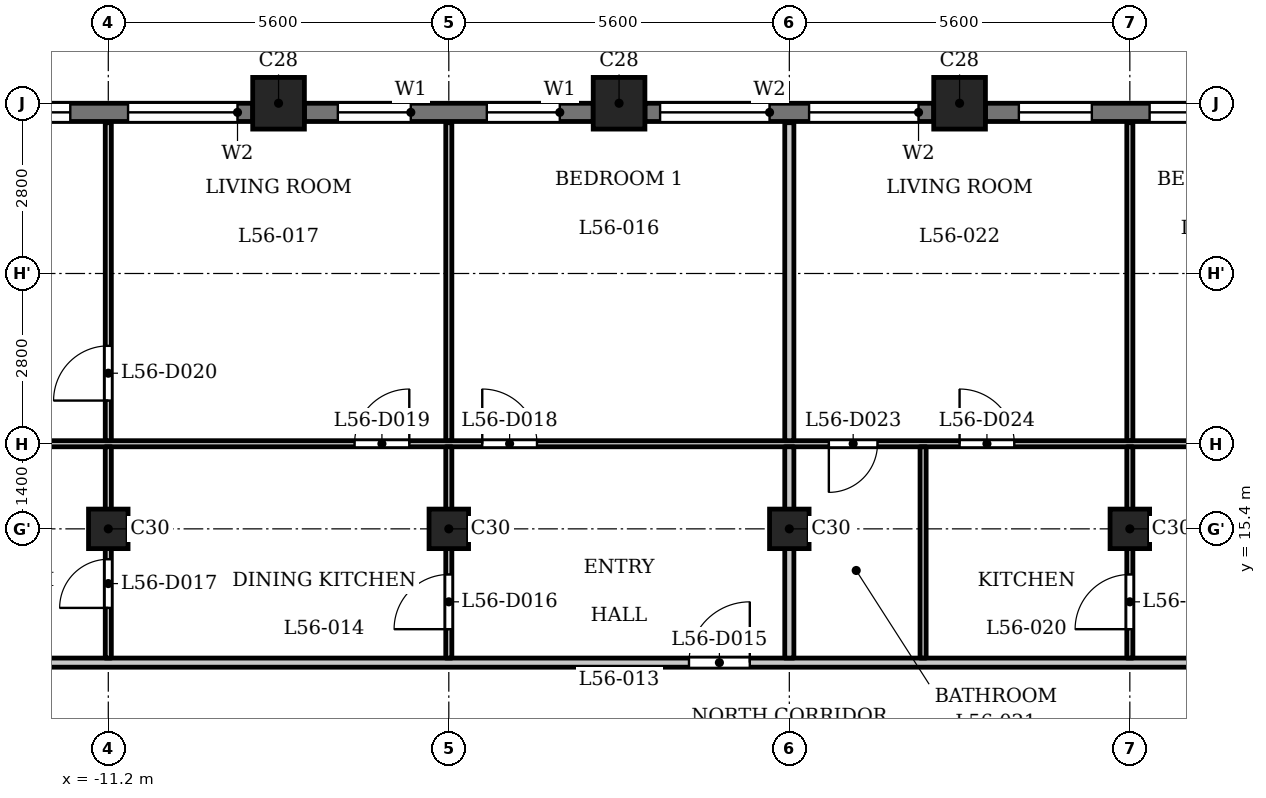
"""IFC4 building model, lengths in metres.
Left out: names, types, materials, properties, quantities, classifications, styles, units other than length and angle.
Written with IfcOpenShell. Run it as: python <this file> out.ifc"""

import sys

from ifc_helpers import new_model, si_unit, direction, frame, frame_2d, origin, origin_2d, place, context, subcontext, project, spatial, rectangle, extrude, element, fill, save


model = new_model("IFC4")
c1 = context("Model", 3, precision=1e-05, world=origin(), true_north=direction((0.0, 1.0)))
c2 = subcontext(c1, "Body", "Model", "MODEL_VIEW")
j1 = project(units=[si_unit("LENGTHUNIT", "METRE"), si_unit("PLANEANGLEUNIT", "RADIAN")], contexts=[c1])
p1 = place(None, origin())
s1 = spatial("IfcSite", under=j1, at=p1, CompositionType="ELEMENT")
p2 = place(p1, origin())
s2 = spatial("IfcBuilding", under=s1, at=p2, CompositionType="ELEMENT")
p3 = place(p2, frame((0.0, 0.0, 216.9)))
s3 = spatial("IfcBuildingStorey", under=s2, at=p3, CompositionType="ELEMENT", Elevation=216.9)
for number, where, z_axis, x_axis in (
    (1, (2.8, 22.4, 0.0), (0.0, 0.0, 1.0), (1.0, 0.0, 0.0)),
    (2, (-2.8, 22.4, 0.0), (0.0, 0.0, 1.0), (1.0, 0.0, 0.0)),
    (3, (-8.4, 22.4, 0.0), (0.0, 0.0, 1.0), (1.0, 0.0, 0.0)),
):
    element("IfcColumn", number, at=place(p3, frame(where, z_axis=z_axis, x_axis=x_axis)), inside=s3, PredefinedType="COLUMN", context=c2, shape_type="SweptSolid", body=[
        extrude(rectangle(XDim=0.85, YDim=0.85, at=origin_2d()), origin(), (0.0, 0.0, 1.0), 3.5),
    ])
for number, where, z_axis, x_axis in (
    (4, (-11.2, 15.4, 0.0), (0.0, 0.0, 1.0), (1.0, 0.0, 0.0)),
    (5, (-5.6, 15.4, 0.0), (0.0, 0.0, 1.0), (1.0, 0.0, 0.0)),
    (6, (0.0, 15.4, 0.0), (0.0, 0.0, 1.0), (1.0, 0.0, 0.0)),
    (7, (5.6, 15.4, 0.0), (0.0, 0.0, 1.0), (1.0, 0.0, 0.0)),
):
    element("IfcColumn", number, at=place(p3, frame(where, z_axis=z_axis, x_axis=x_axis)), inside=s3, PredefinedType="COLUMN", context=c2, shape_type="SweptSolid", body=[
        extrude(rectangle(XDim=0.65, YDim=0.65, at=origin_2d()), origin(), (0.0, 0.0, 1.0), 3.5),
    ])
p4 = place(p3, frame((7.975, 22.25, 0.0), z_axis=(0.0, 0.0, 1.0), x_axis=(-1.0, 0.0, 0.0)))
e8 = element("IfcWall", 8, at=p4, inside=s3, PredefinedType="SOLIDWALL", context=c2, shape_type="SweptSolid", body=[
    extrude(rectangle(XDim=4.75, YDim=0.3, at=frame_2d((2.375, 0.0))), origin(), (0.0, 0.0, 1.0), 2.5),
])
p5 = place(p4, frame((0.25, 0.0, 0.9)))
e9 = element("IfcOpeningElement", 9, at=p5, cuts=e8, PredefinedType="OPENING", context=c2, shape_type="SweptSolid", body=[
    extrude(rectangle(XDim=1.8, YDim=1.25, at=frame_2d((0.9, 0.625))), frame((0.0, 0.16, 0.0), z_axis=(0.0, -1.0, 0.0), x_axis=(1.0, 0.0, 0.0)), (0.0, 0.0, 1.0), 0.32),
])
p6 = place(p4, frame((3.0, 0.0, 0.6)))
e10 = element("IfcOpeningElement", 10, at=p6, cuts=e8, PredefinedType="OPENING", context=c2, shape_type="SweptSolid", body=[
    extrude(rectangle(XDim=1.2, YDim=1.55, at=frame_2d((0.6, 0.775))), frame((0.0, 0.16, 0.0), z_axis=(0.0, -1.0, 0.0), x_axis=(1.0, 0.0, 0.0)), (0.0, 0.0, 1.0), 0.32),
])
p7 = place(p3, frame((2.375, 22.25, 0.0), z_axis=(0.0, 0.0, 1.0), x_axis=(-1.0, 0.0, 0.0)))
e11 = element("IfcWall", 11, at=p7, inside=s3, PredefinedType="SOLIDWALL", context=c2, shape_type="SweptSolid", body=[
    extrude(rectangle(XDim=4.75, YDim=0.3, at=frame_2d((2.375, 0.0))), origin(), (0.0, 0.0, 1.0), 2.5),
])
p8 = place(p7, frame((0.25, 0.0, 0.9)))
e12 = element("IfcOpeningElement", 12, at=p8, cuts=e11, PredefinedType="OPENING", context=c2, shape_type="SweptSolid", body=[
    extrude(rectangle(XDim=1.8, YDim=1.25, at=frame_2d((0.9, 0.625))), frame((0.0, 0.16, 0.0), z_axis=(0.0, -1.0, 0.0), x_axis=(1.0, 0.0, 0.0)), (0.0, 0.0, 1.0), 0.32),
])
p9 = place(p7, frame((2.7, 0.0, 0.9)))
e13 = element("IfcOpeningElement", 13, at=p9, cuts=e11, PredefinedType="OPENING", context=c2, shape_type="SweptSolid", body=[
    extrude(rectangle(XDim=1.8, YDim=1.25, at=frame_2d((0.9, 0.625))), frame((0.0, 0.16, 0.0), z_axis=(0.0, -1.0, 0.0), x_axis=(1.0, 0.0, 0.0)), (0.0, 0.0, 1.0), 0.32),
])
p10 = place(p3, frame((-3.225, 22.25, 0.0), z_axis=(0.0, 0.0, 1.0), x_axis=(-1.0, 0.0, 0.0)))
e14 = element("IfcWall", 14, at=p10, inside=s3, PredefinedType="SOLIDWALL", context=c2, shape_type="SweptSolid", body=[
    extrude(rectangle(XDim=4.75, YDim=0.3, at=frame_2d((2.375, 0.0))), origin(), (0.0, 0.0, 1.0), 2.5),
])
p11 = place(p10, frame((0.55, 0.0, 0.6)))
e15 = element("IfcOpeningElement", 15, at=p11, cuts=e14, PredefinedType="OPENING", context=c2, shape_type="SweptSolid", body=[
    extrude(rectangle(XDim=1.2, YDim=1.55, at=frame_2d((0.6, 0.775))), frame((0.0, 0.16, 0.0), z_axis=(0.0, -1.0, 0.0), x_axis=(1.0, 0.0, 0.0)), (0.0, 0.0, 1.0), 0.32),
])
p12 = place(p10, frame((3.0, 0.0, 0.6)))
e16 = element("IfcOpeningElement", 16, at=p12, cuts=e14, PredefinedType="OPENING", context=c2, shape_type="SweptSolid", body=[
    extrude(rectangle(XDim=1.2, YDim=1.55, at=frame_2d((0.6, 0.775))), frame((0.0, 0.16, 0.0), z_axis=(0.0, -1.0, 0.0), x_axis=(1.0, 0.0, 0.0)), (0.0, 0.0, 1.0), 0.32),
])
p13 = place(p3, frame((-8.825, 22.25, 0.0), z_axis=(0.0, 0.0, 1.0), x_axis=(-1.0, 0.0, 0.0)))
e17 = element("IfcWall", 17, at=p13, inside=s3, PredefinedType="SOLIDWALL", context=c2, shape_type="SweptSolid", body=[
    extrude(rectangle(XDim=4.75, YDim=0.3, at=frame_2d((2.375, 0.0))), origin(), (0.0, 0.0, 1.0), 2.5),
])
p14 = place(p13, frame((0.25, 0.0, 0.9)))
e18 = element("IfcOpeningElement", 18, at=p14, cuts=e17, PredefinedType="OPENING", context=c2, shape_type="SweptSolid", body=[
    extrude(rectangle(XDim=1.8, YDim=1.25, at=frame_2d((0.9, 0.625))), frame((0.0, 0.16, 0.0), z_axis=(0.0, -1.0, 0.0), x_axis=(1.0, 0.0, 0.0)), (0.0, 0.0, 1.0), 0.32),
])
p15 = place(p13, frame((3.0, 0.0, 0.6)))
e19 = element("IfcOpeningElement", 19, at=p15, cuts=e17, PredefinedType="OPENING", context=c2, shape_type="SweptSolid", body=[
    extrude(rectangle(XDim=1.2, YDim=1.55, at=frame_2d((0.6, 0.775))), frame((0.0, 0.16, 0.0), z_axis=(0.0, -1.0, 0.0), x_axis=(1.0, 0.0, 0.0)), (0.0, 0.0, 1.0), 0.32),
])
p16 = place(p3, frame((-17.4, 13.2, 0.0), z_axis=(0.0, 0.0, 1.0), x_axis=(1.0, 0.0, 0.0)))
e20 = element("IfcWall", 20, at=p16, inside=s3, PredefinedType="PARTITIONING", context=c2, shape_type="SweptSolid", body=[
    extrude(rectangle(XDim=34.8, YDim=0.15, at=frame_2d((17.4, 0.0))), origin(), (0.0, 0.0, 1.0), 3.2),
])
p17 = place(p16, frame((0.25, 0.0, 0.0)))
e21 = element("IfcOpeningElement", 21, at=p17, cuts=e20, PredefinedType="OPENING", context=c2, shape_type="SweptSolid", body=[
    extrude(rectangle(XDim=1.0, YDim=2.1, at=frame_2d((0.5, 1.05))), frame((0.0, 0.085, 0.0), z_axis=(0.0, -1.0, 0.0), x_axis=(1.0, 0.0, 0.0)), (0.0, 0.0, 1.0), 0.17),
])
p18 = place(p16, frame((33.65, 0.0, 0.0)))
e22 = element("IfcOpeningElement", 22, at=p18, cuts=e20, PredefinedType="OPENING", context=c2, shape_type="SweptSolid", body=[
    extrude(rectangle(XDim=1.0, YDim=2.1, at=frame_2d((0.5, 1.05))), frame((0.0, 0.085, 0.0), z_axis=(0.0, -1.0, 0.0), x_axis=(1.0, 0.0, 0.0)), (0.0, 0.0, 1.0), 0.17),
])
p19 = place(p16, frame((15.75, 0.0, 0.0)))
e23 = element("IfcOpeningElement", 23, at=p19, cuts=e20, PredefinedType="OPENING", context=c2, shape_type="SweptSolid", body=[
    extrude(rectangle(XDim=1.0, YDim=2.1, at=frame_2d((0.5, 1.05))), frame((0.0, 0.085, 0.0), z_axis=(0.0, -1.0, 0.0), x_axis=(1.0, 0.0, 0.0)), (0.0, 0.0, 1.0), 0.17),
])
p20 = place(p16, frame((26.95, 0.0, 0.0)))
e24 = element("IfcOpeningElement", 24, at=p20, cuts=e20, PredefinedType="OPENING", context=c2, shape_type="SweptSolid", body=[
    extrude(rectangle(XDim=1.0, YDim=2.1, at=frame_2d((0.5, 1.05))), frame((0.0, 0.085, 0.0), z_axis=(0.0, -1.0, 0.0), x_axis=(1.0, 0.0, 0.0)), (0.0, 0.0, 1.0), 0.17),
])
p21 = place(p16, frame((29.75, 0.0, 0.0)))
e25 = element("IfcOpeningElement", 25, at=p21, cuts=e20, PredefinedType="OPENING", context=c2, shape_type="SweptSolid", body=[
    extrude(rectangle(XDim=1.0, YDim=2.1, at=frame_2d((0.5, 1.05))), frame((0.0, 0.085, 0.0), z_axis=(0.0, -1.0, 0.0), x_axis=(1.0, 0.0, 0.0)), (0.0, 0.0, 1.0), 0.17),
])
p22 = place(p3, frame((-16.725, 16.8, 0.0), z_axis=(0.0, 0.0, 1.0), x_axis=(1.0, 0.0, 0.0)))
e26 = element("IfcWall", 26, at=p22, inside=s3, PredefinedType="PARTITIONING", context=c2, shape_type="SweptSolid", body=[
    extrude(rectangle(XDim=33.45, YDim=0.1, at=frame_2d((16.725, 0.0))), origin(), (0.0, 0.0, 1.0), 3.2),
])
p23 = place(p22, frame((11.675, 0.0, 0.0)))
e27 = element("IfcOpeningElement", 27, at=p23, cuts=e26, PredefinedType="OPENING", context=c2, shape_type="SweptSolid", body=[
    extrude(rectangle(XDim=0.9, YDim=2.1, at=frame_2d((0.45, 1.05))), frame((0.0, 0.06, 0.0), z_axis=(0.0, -1.0, 0.0), x_axis=(1.0, 0.0, 0.0)), (0.0, 0.0, 1.0), 0.12),
])
p24 = place(p22, frame((9.575, 0.0, 0.0)))
e28 = element("IfcOpeningElement", 28, at=p24, cuts=e26, PredefinedType="OPENING", context=c2, shape_type="SweptSolid", body=[
    extrude(rectangle(XDim=0.9, YDim=2.1, at=frame_2d((0.45, 1.05))), frame((0.0, 0.06, 0.0), z_axis=(0.0, -1.0, 0.0), x_axis=(1.0, 0.0, 0.0)), (0.0, 0.0, 1.0), 0.12),
])
p25 = place(p22, frame((17.375, 0.0, 0.0)))
e29 = element("IfcOpeningElement", 29, at=p25, cuts=e26, PredefinedType="OPENING", context=c2, shape_type="SweptSolid", body=[
    extrude(rectangle(XDim=0.8, YDim=2.1, at=frame_2d((0.4, 1.05))), frame((0.0, 0.06, 0.0), z_axis=(0.0, -1.0, 0.0), x_axis=(1.0, 0.0, 0.0)), (0.0, 0.0, 1.0), 0.12),
])
p26 = place(p22, frame((19.525, 0.0, 0.0)))
e30 = element("IfcOpeningElement", 30, at=p26, cuts=e26, PredefinedType="OPENING", context=c2, shape_type="SweptSolid", body=[
    extrude(rectangle(XDim=0.9, YDim=2.1, at=frame_2d((0.45, 1.05))), frame((0.0, 0.06, 0.0), z_axis=(0.0, -1.0, 0.0), x_axis=(1.0, 0.0, 0.0)), (0.0, 0.0, 1.0), 0.12),
])
p27 = place(p22, frame((23.775, 0.0, 0.0)))
e31 = element("IfcOpeningElement", 31, at=p27, cuts=e26, PredefinedType="OPENING", context=c2, shape_type="SweptSolid", body=[
    extrude(rectangle(XDim=0.9, YDim=2.1, at=frame_2d((0.45, 1.05))), frame((0.0, 0.06, 0.0), z_axis=(0.0, -1.0, 0.0), x_axis=(1.0, 0.0, 0.0)), (0.0, 0.0, 1.0), 0.12),
])
p28 = place(p22, frame((26.125, 0.0, 0.0)))
e32 = element("IfcOpeningElement", 32, at=p28, cuts=e26, PredefinedType="OPENING", context=c2, shape_type="SweptSolid", body=[
    extrude(rectangle(XDim=0.9, YDim=2.1, at=frame_2d((0.45, 1.05))), frame((0.0, 0.06, 0.0), z_axis=(0.0, -1.0, 0.0), x_axis=(1.0, 0.0, 0.0)), (0.0, 0.0, 1.0), 0.12),
])
p29 = place(p22, frame((32.075, 0.0, 0.0)))
e33 = element("IfcOpeningElement", 33, at=p29, cuts=e26, PredefinedType="OPENING", context=c2, shape_type="SweptSolid", body=[
    extrude(rectangle(XDim=0.8, YDim=2.1, at=frame_2d((0.4, 1.05))), frame((0.0, 0.06, 0.0), z_axis=(0.0, -1.0, 0.0), x_axis=(1.0, 0.0, 0.0)), (0.0, 0.0, 1.0), 0.12),
])
p30 = place(p22, frame((29.175, 0.0, 0.0)))
e34 = element("IfcOpeningElement", 34, at=p30, cuts=e26, PredefinedType="OPENING", context=c2, shape_type="SweptSolid", body=[
    extrude(rectangle(XDim=0.9, YDim=2.1, at=frame_2d((0.45, 1.05))), frame((0.0, 0.06, 0.0), z_axis=(0.0, -1.0, 0.0), x_axis=(1.0, 0.0, 0.0)), (0.0, 0.0, 1.0), 0.12),
])
p31 = place(p3, frame((-11.2, 13.275, 0.0), z_axis=(0.0, 0.0, 1.0), x_axis=(0.0, 1.0, 0.0)))
e35 = element("IfcWall", 35, at=p31, inside=s3, PredefinedType="PARTITIONING", context=c2, shape_type="SweptSolid", body=[
    extrude(rectangle(XDim=3.475, YDim=0.1, at=frame_2d((1.738, 0.0))), origin(), (0.0, 0.0, 1.0), 3.2),
])
p32 = place(p31, frame((0.825, 0.0, 0.0)))
e36 = element("IfcOpeningElement", 36, at=p32, cuts=e35, PredefinedType="OPENING", context=c2, shape_type="SweptSolid", body=[
    extrude(rectangle(XDim=0.8, YDim=2.1, at=frame_2d((0.4, 1.05))), frame((0.0, 0.06, 0.0), z_axis=(0.0, -1.0, 0.0), x_axis=(1.0, 0.0, 0.0)), (0.0, 0.0, 1.0), 0.12),
])
p33 = place(p3, frame((-11.2, 16.85, 0.0), z_axis=(0.0, 0.0, 1.0), x_axis=(0.0, 1.0, 0.0)))
e37 = element("IfcWall", 37, at=p33, inside=s3, PredefinedType="PARTITIONING", context=c2, shape_type="SweptSolid", body=[
    extrude(rectangle(XDim=5.23, YDim=0.1, at=frame_2d((2.615, 0.0))), origin(), (0.0, 0.0, 1.0), 3.2),
])
p34 = place(p33, frame((0.66, 0.0, 0.0)))
e38 = element("IfcOpeningElement", 38, at=p34, cuts=e37, PredefinedType="OPENING", context=c2, shape_type="SweptSolid", body=[
    extrude(rectangle(XDim=0.9, YDim=2.1, at=frame_2d((0.45, 1.05))), frame((0.0, 0.06, 0.0), z_axis=(0.0, -1.0, 0.0), x_axis=(1.0, 0.0, 0.0)), (0.0, 0.0, 1.0), 0.12),
])
p35 = place(p3, frame((-5.6, 13.275, 0.0), z_axis=(0.0, 0.0, 1.0), x_axis=(0.0, 1.0, 0.0)))
e39 = element("IfcWall", 39, at=p35, inside=s3, PredefinedType="PARTITIONING", context=c2, shape_type="SweptSolid", body=[
    extrude(rectangle(XDim=3.475, YDim=0.1, at=frame_2d((1.738, 0.0))), origin(), (0.0, 0.0, 1.0), 3.2),
])
p36 = place(p35, frame((0.475, 0.0, 0.0)))
e40 = element("IfcOpeningElement", 40, at=p36, cuts=e39, PredefinedType="OPENING", context=c2, shape_type="SweptSolid", body=[
    extrude(rectangle(XDim=0.9, YDim=2.1, at=frame_2d((0.45, 1.05))), frame((0.0, 0.06, 0.0), z_axis=(0.0, -1.0, 0.0), x_axis=(1.0, 0.0, 0.0)), (0.0, 0.0, 1.0), 0.12),
])
p37 = place(p3, frame((-5.6, 16.85, 0.0), z_axis=(0.0, 0.0, 1.0), x_axis=(0.0, 1.0, 0.0)))
e41 = element("IfcWall", 41, at=p37, inside=s3, PredefinedType="PARTITIONING", context=c2, shape_type="SweptSolid", body=[
    extrude(rectangle(XDim=5.23, YDim=0.1, at=frame_2d((2.615, 0.0))), origin(), (0.0, 0.0, 1.0), 3.2),
])
p38 = place(p3, frame((0.0, 13.275, 0.0), z_axis=(0.0, 0.0, 1.0), x_axis=(0.0, 1.0, 0.0)))
e42 = element("IfcWall", 42, at=p38, inside=s3, PredefinedType="PARTITIONING", context=c2, shape_type="SweptSolid", body=[
    extrude(rectangle(XDim=3.475, YDim=0.15, at=frame_2d((1.738, 0.0))), origin(), (0.0, 0.0, 1.0), 3.2),
])
p39 = place(p3, frame((0.0, 16.85, 0.0), z_axis=(0.0, 0.0, 1.0), x_axis=(0.0, 1.0, 0.0)))
e43 = element("IfcWall", 43, at=p39, inside=s3, PredefinedType="PARTITIONING", context=c2, shape_type="SweptSolid", body=[
    extrude(rectangle(XDim=5.23, YDim=0.15, at=frame_2d((2.615, 0.0))), origin(), (0.0, 0.0, 1.0), 3.2),
])
p40 = place(p3, frame((2.2, 13.275, 0.0), z_axis=(0.0, 0.0, 1.0), x_axis=(0.0, 1.0, 0.0)))
e44 = element("IfcWall", 44, at=p40, inside=s3, PredefinedType="PARTITIONING", context=c2, shape_type="SweptSolid", body=[
    extrude(rectangle(XDim=3.475, YDim=0.1, at=frame_2d((1.738, 0.0))), origin(), (0.0, 0.0, 1.0), 3.2),
])
p41 = place(p3, frame((5.6, 13.275, 0.0), z_axis=(0.0, 0.0, 1.0), x_axis=(0.0, 1.0, 0.0)))
e45 = element("IfcWall", 45, at=p41, inside=s3, PredefinedType="PARTITIONING", context=c2, shape_type="SweptSolid", body=[
    extrude(rectangle(XDim=3.475, YDim=0.1, at=frame_2d((1.738, 0.0))), origin(), (0.0, 0.0, 1.0), 3.2),
])
p42 = place(p41, frame((0.475, 0.0, 0.0)))
e46 = element("IfcOpeningElement", 46, at=p42, cuts=e45, PredefinedType="OPENING", context=c2, shape_type="SweptSolid", body=[
    extrude(rectangle(XDim=0.9, YDim=2.1, at=frame_2d((0.45, 1.05))), frame((0.0, 0.06, 0.0), z_axis=(0.0, -1.0, 0.0), x_axis=(1.0, 0.0, 0.0)), (0.0, 0.0, 1.0), 0.12),
])
p43 = place(p3, frame((5.6, 16.85, 0.0), z_axis=(0.0, 0.0, 1.0), x_axis=(0.0, 1.0, 0.0)))
e47 = element("IfcWall", 47, at=p43, inside=s3, PredefinedType="PARTITIONING", context=c2, shape_type="SweptSolid", body=[
    extrude(rectangle(XDim=5.23, YDim=0.1, at=frame_2d((2.615, 0.0))), origin(), (0.0, 0.0, 1.0), 3.2),
])
p44 = place(p19, origin())
e48 = element("IfcDoor", 48, at=p44, inside=s3, OperationType="SINGLE_SWING_LEFT", PredefinedType="DOOR", context=c2, shape_type="SweptSolid", body=[
    extrude(rectangle(XDim=1.0, YDim=2.1, at=frame_2d((0.5, 1.05))), frame((0.0, 0.025, 0.0), z_axis=(0.0, -1.0, 0.0), x_axis=(1.0, 0.0, 0.0)), (0.0, 0.0, 1.0), 0.05),
])
fill(e23, e48)
p45 = place(p36, origin())
e49 = element("IfcDoor", 49, at=p45, inside=s3, OperationType="SINGLE_SWING_RIGHT", PredefinedType="DOOR", context=c2, shape_type="SweptSolid", body=[
    extrude(rectangle(XDim=0.9, YDim=2.1, at=frame_2d((0.45, 1.05))), frame((0.0, 0.025, 0.0), z_axis=(0.0, -1.0, 0.0), x_axis=(1.0, 0.0, 0.0)), (0.0, 0.0, 1.0), 0.05),
])
fill(e40, e49)
p46 = place(p32, origin())
e50 = element("IfcDoor", 50, at=p46, inside=s3, OperationType="SINGLE_SWING_RIGHT", PredefinedType="DOOR", context=c2, shape_type="SweptSolid", body=[
    extrude(rectangle(XDim=0.8, YDim=2.1, at=frame_2d((0.4, 1.05))), frame((0.0, 0.025, 0.0), z_axis=(0.0, -1.0, 0.0), x_axis=(1.0, 0.0, 0.0)), (0.0, 0.0, 1.0), 0.05),
])
fill(e36, e50)
p47 = place(p23, origin())
e51 = element("IfcDoor", 51, at=p47, inside=s3, OperationType="SINGLE_SWING_RIGHT", PredefinedType="DOOR", context=c2, shape_type="SweptSolid", body=[
    extrude(rectangle(XDim=0.9, YDim=2.1, at=frame_2d((0.45, 1.05))), frame((0.0, 0.025, 0.0), z_axis=(0.0, -1.0, 0.0), x_axis=(1.0, 0.0, 0.0)), (0.0, 0.0, 1.0), 0.05),
])
fill(e27, e51)
p48 = place(p24, origin())
e52 = element("IfcDoor", 52, at=p48, inside=s3, OperationType="SINGLE_SWING_LEFT", PredefinedType="DOOR", context=c2, shape_type="SweptSolid", body=[
    extrude(rectangle(XDim=0.9, YDim=2.1, at=frame_2d((0.45, 1.05))), frame((0.0, 0.025, 0.0), z_axis=(0.0, -1.0, 0.0), x_axis=(1.0, 0.0, 0.0)), (0.0, 0.0, 1.0), 0.05),
])
fill(e28, e52)
p49 = place(p34, origin())
e53 = element("IfcDoor", 53, at=p49, inside=s3, OperationType="SINGLE_SWING_RIGHT", PredefinedType="DOOR", context=c2, shape_type="SweptSolid", body=[
    extrude(rectangle(XDim=0.9, YDim=2.1, at=frame_2d((0.45, 1.05))), frame((0.0, 0.025, 0.0), z_axis=(0.0, -1.0, 0.0), x_axis=(1.0, 0.0, 0.0)), (0.0, 0.0, 1.0), 0.05),
])
fill(e38, e53)
p50 = place(p42, origin())
e54 = element("IfcDoor", 54, at=p50, inside=s3, OperationType="SINGLE_SWING_RIGHT", PredefinedType="DOOR", context=c2, shape_type="SweptSolid", body=[
    extrude(rectangle(XDim=0.9, YDim=2.1, at=frame_2d((0.45, 1.05))), frame((0.0, 0.025, 0.0), z_axis=(0.0, -1.0, 0.0), x_axis=(1.0, 0.0, 0.0)), (0.0, 0.0, 1.0), 0.05),
])
fill(e46, e54)
p51 = place(p25, origin())
e55 = element("IfcDoor", 55, at=p51, inside=s3, OperationType="SINGLE_SWING_LEFT", PredefinedType="DOOR", context=c2, shape_type="SweptSolid", body=[
    extrude(rectangle(XDim=0.8, YDim=2.1, at=frame_2d((0.4, 1.05))), frame((0.0, 0.025, 0.0), z_axis=(0.0, -1.0, 0.0), x_axis=(1.0, 0.0, 0.0)), (0.0, 0.0, 1.0), 0.05),
])
fill(e29, e55)
p52 = place(p26, origin())
e56 = element("IfcDoor", 56, at=p52, inside=s3, OperationType="SINGLE_SWING_RIGHT", PredefinedType="DOOR", context=c2, shape_type="SweptSolid", body=[
    extrude(rectangle(XDim=0.9, YDim=2.1, at=frame_2d((0.45, 1.05))), frame((0.0, 0.025, 0.0), z_axis=(0.0, -1.0, 0.0), x_axis=(1.0, 0.0, 0.0)), (0.0, 0.0, 1.0), 0.05),
])
fill(e30, e56)
p53 = place(p5, origin())
e57 = element("IfcWindow", 57, at=p53, inside=s3, PartitioningType="SINGLE_PANEL", PredefinedType="WINDOW", context=c2, shape_type="SweptSolid", body=[
    extrude(rectangle(XDim=1.8, YDim=1.25, at=frame_2d((0.9, 0.625))), frame((0.0, 0.03, 0.0), z_axis=(0.0, -1.0, 0.0), x_axis=(1.0, 0.0, 0.0)), (0.0, 0.0, 1.0), 0.06),
])
fill(e9, e57)
p54 = place(p6, origin())
e58 = element("IfcWindow", 58, at=p54, inside=s3, PartitioningType="SINGLE_PANEL", PredefinedType="WINDOW", context=c2, shape_type="SweptSolid", body=[
    extrude(rectangle(XDim=1.2, YDim=1.55, at=frame_2d((0.6, 0.775))), frame((0.0, 0.03, 0.0), z_axis=(0.0, -1.0, 0.0), x_axis=(1.0, 0.0, 0.0)), (0.0, 0.0, 1.0), 0.06),
])
fill(e10, e58)
p55 = place(p8, origin())
e59 = element("IfcWindow", 59, at=p55, inside=s3, PartitioningType="SINGLE_PANEL", PredefinedType="WINDOW", context=c2, shape_type="SweptSolid", body=[
    extrude(rectangle(XDim=1.8, YDim=1.25, at=frame_2d((0.9, 0.625))), frame((0.0, 0.03, 0.0), z_axis=(0.0, -1.0, 0.0), x_axis=(1.0, 0.0, 0.0)), (0.0, 0.0, 1.0), 0.06),
])
fill(e12, e59)
p56 = place(p9, origin())
e60 = element("IfcWindow", 60, at=p56, inside=s3, PartitioningType="SINGLE_PANEL", PredefinedType="WINDOW", context=c2, shape_type="SweptSolid", body=[
    extrude(rectangle(XDim=1.8, YDim=1.25, at=frame_2d((0.9, 0.625))), frame((0.0, 0.03, 0.0), z_axis=(0.0, -1.0, 0.0), x_axis=(1.0, 0.0, 0.0)), (0.0, 0.0, 1.0), 0.06),
])
fill(e13, e60)
p57 = place(p11, origin())
e61 = element("IfcWindow", 61, at=p57, inside=s3, PartitioningType="SINGLE_PANEL", PredefinedType="WINDOW", context=c2, shape_type="SweptSolid", body=[
    extrude(rectangle(XDim=1.2, YDim=1.55, at=frame_2d((0.6, 0.775))), frame((0.0, 0.03, 0.0), z_axis=(0.0, -1.0, 0.0), x_axis=(1.0, 0.0, 0.0)), (0.0, 0.0, 1.0), 0.06),
])
fill(e15, e61)
p58 = place(p12, origin())
e62 = element("IfcWindow", 62, at=p58, inside=s3, PartitioningType="SINGLE_PANEL", PredefinedType="WINDOW", context=c2, shape_type="SweptSolid", body=[
    extrude(rectangle(XDim=1.2, YDim=1.55, at=frame_2d((0.6, 0.775))), frame((0.0, 0.03, 0.0), z_axis=(0.0, -1.0, 0.0), x_axis=(1.0, 0.0, 0.0)), (0.0, 0.0, 1.0), 0.06),
])
fill(e16, e62)
p59 = place(p14, origin())
e63 = element("IfcWindow", 63, at=p59, inside=s3, PartitioningType="SINGLE_PANEL", PredefinedType="WINDOW", context=c2, shape_type="SweptSolid", body=[
    extrude(rectangle(XDim=1.8, YDim=1.25, at=frame_2d((0.9, 0.625))), frame((0.0, 0.03, 0.0), z_axis=(0.0, -1.0, 0.0), x_axis=(1.0, 0.0, 0.0)), (0.0, 0.0, 1.0), 0.06),
])
fill(e18, e63)
p60 = place(p15, origin())
e64 = element("IfcWindow", 64, at=p60, inside=s3, PartitioningType="SINGLE_PANEL", PredefinedType="WINDOW", context=c2, shape_type="SweptSolid", body=[
    extrude(rectangle(XDim=1.2, YDim=1.55, at=frame_2d((0.6, 0.775))), frame((0.0, 0.03, 0.0), z_axis=(0.0, -1.0, 0.0), x_axis=(1.0, 0.0, 0.0)), (0.0, 0.0, 1.0), 0.06),
])
fill(e19, e64)
save(model, sys.argv[1])
